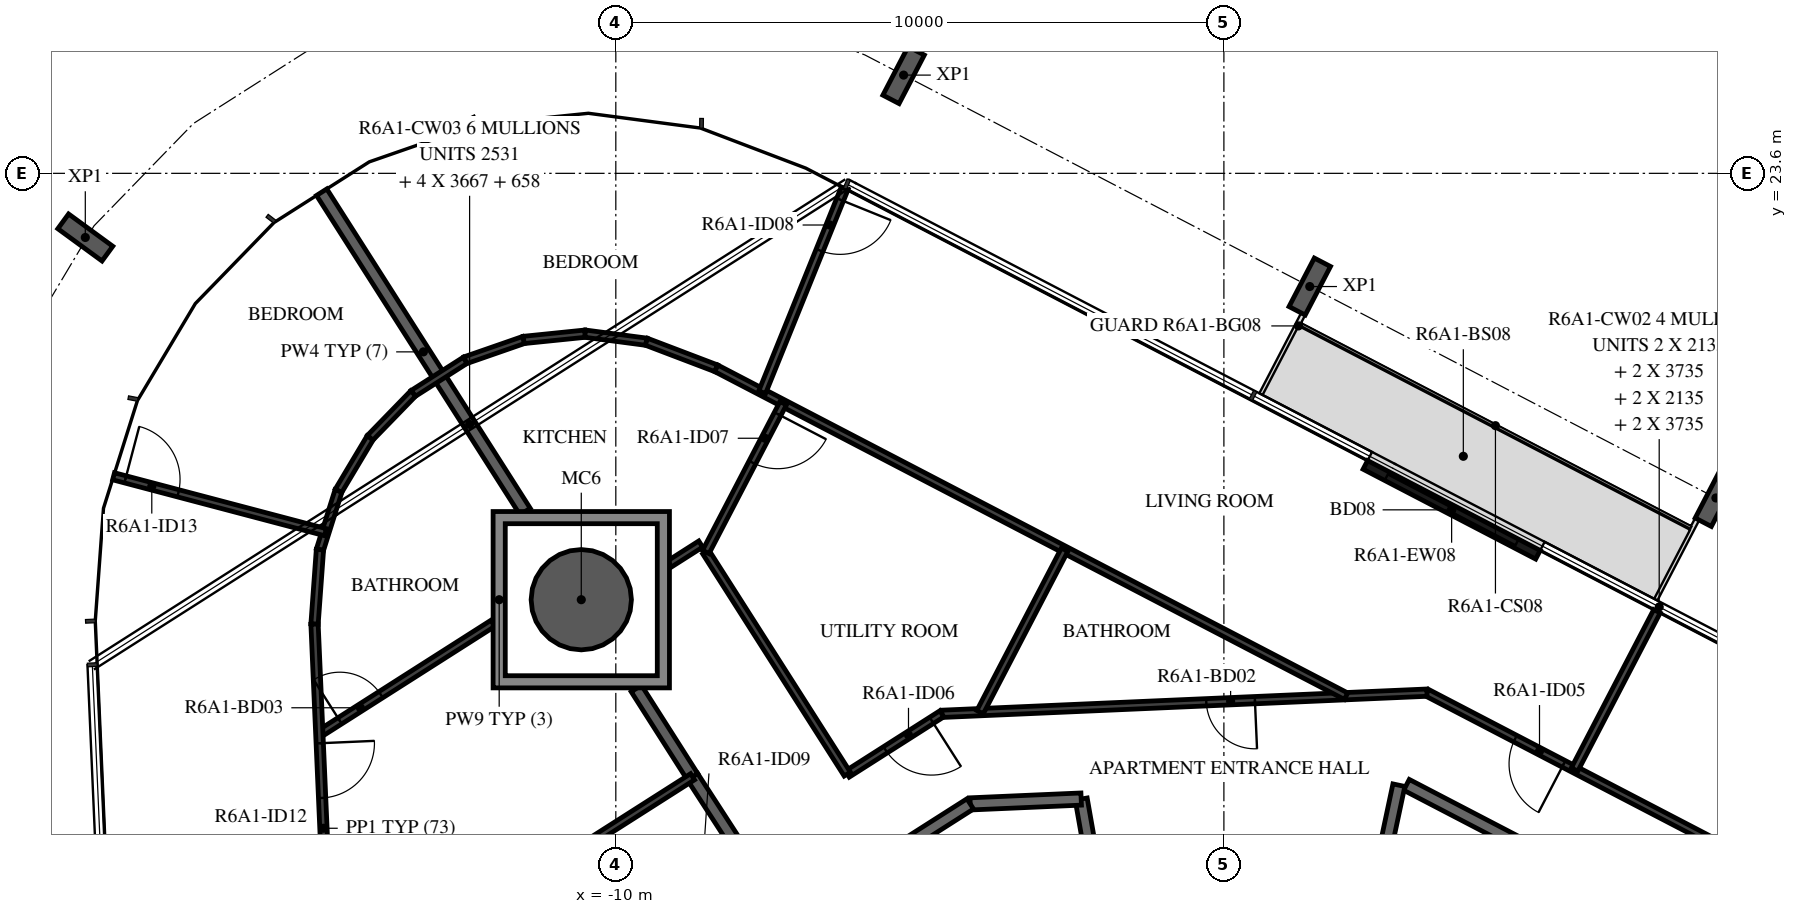
"""IFC4 building model, lengths in metres.
Left out: names, types, materials, properties, quantities, classifications, styles, units other than length and angle.
Written with IfcOpenShell. Run it as: python <this file> out.ifc"""

import sys

from ifc_helpers import new_model, si_unit, direction, frame, frame_2d, origin, origin_2d, place, context, subcontext, project, spatial, polyline, rectangle, hollow_circle, i_section, outline, extrude, element, fill, save


model = new_model("IFC4")
c1 = context("Model", 3, precision=1e-05, world=origin(), true_north=direction((0.0, 1.0)))
c2 = subcontext(c1, "Body", "Model", "MODEL_VIEW")
j1 = project(units=[si_unit("LENGTHUNIT", "METRE"), si_unit("PLANEANGLEUNIT", "RADIAN")], contexts=[c1])
p1 = place(None, origin())
s1 = spatial("IfcSite", under=j1, at=p1, CompositionType="ELEMENT")
p2 = place(p1, origin())
s2 = spatial("IfcBuilding", under=s1, at=p2, CompositionType="ELEMENT")
p3 = place(p2, frame((0.0, 0.0, 230.2)))
s3 = spatial("IfcBuildingStorey", under=s2, at=p3, CompositionType="ELEMENT", Elevation=230.2)
p4 = place(p3, frame((-10.568, 16.588, -0.38), z_axis=(0.0, 0.0, 1.0), x_axis=(1.0, 0.0, 0.0)))
e1 = element("IfcColumn", 1, at=p4, inside=s3, PredefinedType="COLUMN", context=c2, shape_type="SweptSolid", body=[
    extrude(hollow_circle(Radius=0.825, WallThickness=0.04, at=origin_2d()), origin(), (0.0, 0.0, 1.0), 3.5),
])
for number, where, z_axis, x_axis in (
    (2, (8.091, 18.261, -0.38), (0.0, 0.0, 1.0), (0.887, -0.462, 0.0)),
    (3, (1.412, 21.739, -0.38), (0.0, 0.0, 1.0), (0.887, -0.462, 0.0)),
    (4, (-5.267, 25.216, -0.38), (0.0, 0.0, 1.0), (0.887, -0.462, 0.0)),
    (5, (-18.724, 22.545, -0.38), (0.0, 0.0, 1.0), (0.59, 0.808, 0.0)),
):
    element("IfcColumn", number, at=place(p3, frame(where, z_axis=z_axis, x_axis=x_axis)), inside=s3, PredefinedType="COLUMN", context=c2, shape_type="SweptSolid", body=[
        extrude(i_section(OverallWidth=0.3, OverallDepth=0.9, WebThickness=0.019, FlangeThickness=0.035, FilletRadius=0.03, at=origin_2d()), origin(), (0.0, 0.0, 1.0), 3.5),
    ])
p5 = place(p3, frame((5.164, 17.327, 0.0), z_axis=(0.0, 0.0, 1.0), x_axis=(-0.886983100078, 0.461801884119, 0.0)))
e6 = element("IfcWall", 6, at=p5, inside=s3, PredefinedType="STANDARD", context=c2, shape_type="SweptSolid", body=[
    extrude(rectangle(XDim=3.2, YDim=0.16, at=frame_2d((1.6, 0.0))), origin(), (0.0, 0.0, 1.0), 3.12),
])
p6 = place(p5, frame((0.4, 0.0, 0.0)))
e7 = element("IfcOpeningElement", 7, at=p6, cuts=e6, PredefinedType="OPENING", context=c2, shape_type="SweptSolid", body=[
    extrude(rectangle(XDim=2.4, YDim=2.4, at=frame_2d((1.2, 1.2))), frame((0.0, 0.09, 0.0), z_axis=(0.0, -1.0, 0.0), x_axis=(1.0, 0.0, 0.0)), (0.0, 0.0, 1.0), 0.18),
])
p7 = place(p3, frame((9.372, 10.228, 0.0), z_axis=(0.0, 0.0, 1.0), x_axis=(-0.887005184532, 0.461759464021, 0.0)))
e8 = element("IfcWall", 8, at=p7, inside=s3, PredefinedType="STANDARD", context=c2, shape_type="SweptSolid", body=[
    extrude(rectangle(XDim=7.181, YDim=0.2, at=frame_2d((3.591, 0.0))), origin(), (0.0, 0.0, 1.0), 3.12),
])
p8 = place(p3, frame((2.878, 13.538, 0.0), z_axis=(0.0, 0.0, 1.0), x_axis=(-0.207893604596, -0.978151444904, 0.0)))
e9 = element("IfcWall", 9, at=p8, inside=s3, PredefinedType="STANDARD", context=c2, shape_type="SweptSolid", body=[
    extrude(rectangle(XDim=1.927, YDim=0.2, at=frame_2d((0.963, 0.0))), origin(), (0.0, 0.0, 1.0), 3.12),
])
p9 = place(p3, frame((-2.074, 11.761, 0.0), z_axis=(0.0, 0.0, 1.0), x_axis=(-0.173679082312, 0.984802303189, 0.0)))
e10 = element("IfcWall", 10, at=p9, inside=s3, PredefinedType="STANDARD", context=c2, shape_type="SweptSolid", body=[
    extrude(rectangle(XDim=1.573, YDim=0.2, at=frame_2d((0.787, 0.0))), origin(), (0.0, 0.0, 1.0), 3.12),
])
p10 = place(p3, frame((-2.347, 13.31, 0.0), z_axis=(0.0, 0.0, 1.0), x_axis=(-0.999050095671, -0.043576442492, 0.0)))
e11 = element("IfcWall", 11, at=p10, inside=s3, PredefinedType="STANDARD", context=c2, shape_type="SweptSolid", body=[
    extrude(rectangle(XDim=1.826, YDim=0.2, at=frame_2d((0.913, 0.0))), origin(), (0.0, 0.0, 1.0), 3.12),
])
p11 = place(p3, frame((-4.172, 13.231, 0.0), z_axis=(0.0, 0.0, 1.0), x_axis=(-0.843388394728, -0.537304397561, 0.0)))
e12 = element("IfcWall", 12, at=p11, inside=s3, PredefinedType="STANDARD", context=c2, shape_type="SweptSolid", body=[
    extrude(rectangle(XDim=7.181, YDim=0.2, at=frame_2d((3.59, 0.0))), origin(), (0.0, 0.0, 1.0), 3.12),
])
p12 = place(p3, frame((-8.738, 13.677, 0.0), z_axis=(0.0, 0.0, 1.0), x_axis=(0.54358037296, -0.839357121929, 0.0)))
e13 = element("IfcWall", 13, at=p12, inside=s3, PredefinedType="STANDARD", context=c2, shape_type="SweptSolid", body=[
    extrude(rectangle(XDim=2.83, YDim=0.2, at=frame_2d((1.415, 0.0))), origin(), (0.0, 0.0, 1.0), 3.12),
])
p13 = place(p3, frame((-9.663, 15.129, 0.0), z_axis=(0.0, 0.0, 1.0), x_axis=(0.537205715853, -0.843451254581, 0.0)))
e14 = element("IfcWall", 14, at=p13, inside=s3, PredefinedType="STANDARD", context=c2, shape_type="SweptSolid", body=[
    extrude(rectangle(XDim=1.722, YDim=0.2, at=frame_2d((0.861, 0.0))), origin(), (0.0, 0.0, 1.0), 3.12),
])
p14 = place(p3, frame((-14.837, 23.29, 0.0), z_axis=(0.0, 0.0, 1.0), x_axis=(0.537316863221, -0.843380452998, 0.0)))
e15 = element("IfcWall", 15, at=p14, inside=s3, PredefinedType="STANDARD", context=c2, shape_type="SweptSolid", body=[
    extrude(rectangle(XDim=6.227, YDim=0.2, at=frame_2d((3.113, 0.0))), origin(), (0.0, 0.0, 1.0), 3.12),
])
p15 = place(p3, frame((10.421, 11.373, 0.0), z_axis=(0.0, 0.0, 1.0), x_axis=(-0.887012970857, 0.461744506769, 0.0)))
e16 = element("IfcWall", 16, at=p15, inside=s3, PredefinedType="PARTITIONING", context=c2, shape_type="SweptSolid", body=[
    extrude(rectangle(XDim=7.985, YDim=0.12, at=frame_2d((3.992, 0.0))), origin(), (0.0, 0.0, 1.0), 3.12),
])
p16 = place(p15, frame((5.448, 0.0, 0.0)))
e17 = element("IfcOpeningElement", 17, at=p16, cuts=e16, PredefinedType="OPENING", context=c2, shape_type="SweptSolid", body=[
    extrude(rectangle(XDim=0.9, YDim=2.1, at=frame_2d((0.45, 1.05))), frame((0.0, 0.07, 0.0), z_axis=(0.0, -1.0, 0.0), x_axis=(1.0, 0.0, 0.0)), (0.0, 0.0, 1.0), 0.14),
])
p17 = place(p3, frame((3.339, 15.06, 0.0), z_axis=(0.0, 0.0, 1.0), x_axis=(-0.999047716945, -0.043630943905, 0.0)))
e18 = element("IfcWall", 18, at=p17, inside=s3, PredefinedType="PARTITIONING", context=c2, shape_type="SweptSolid", body=[
    extrude(rectangle(XDim=7.985, YDim=0.12, at=frame_2d((3.992, 0.0))), origin(), (0.0, 0.0, 1.0), 3.12),
])
p18 = place(p17, frame((2.831, 0.0, 0.0)))
e19 = element("IfcOpeningElement", 19, at=p18, cuts=e18, PredefinedType="OPENING", context=c2, shape_type="SweptSolid", body=[
    extrude(rectangle(XDim=0.8, YDim=2.1, at=frame_2d((0.4, 1.05))), frame((0.0, 0.07, 0.0), z_axis=(0.0, -1.0, 0.0), x_axis=(1.0, 0.0, 0.0)), (0.0, 0.0, 1.0), 0.14),
])
p19 = place(p3, frame((-4.639, 14.712, 0.0), z_axis=(0.0, 0.0, 1.0), x_axis=(-0.843361471414, -0.537346655833, 0.0)))
e20 = element("IfcWall", 20, at=p19, inside=s3, PredefinedType="PARTITIONING", context=c2, shape_type="SweptSolid", body=[
    extrude(rectangle(XDim=1.844, YDim=0.12, at=frame_2d((0.922, 0.0))), origin(), (0.0, 0.0, 1.0), 3.12),
])
p20 = place(p19, frame((0.2, 0.0, 0.0)))
e21 = element("IfcOpeningElement", 21, at=p20, cuts=e20, PredefinedType="OPENING", context=c2, shape_type="SweptSolid", body=[
    extrude(rectangle(XDim=0.9, YDim=2.1, at=frame_2d((0.45, 1.05))), frame((0.0, 0.07, 0.0), z_axis=(0.0, -1.0, 0.0), x_axis=(1.0, 0.0, 0.0)), (0.0, 0.0, 1.0), 0.14),
])
p21 = place(p3, frame((-6.194, 13.721, 0.0), z_axis=(0.0, 0.0, 1.0), x_axis=(-0.537316807294, 0.843380488629, 0.0)))
e22 = element("IfcWall", 22, at=p21, inside=s3, PredefinedType="PARTITIONING", context=c2, shape_type="SweptSolid", body=[
    extrude(rectangle(XDim=4.331, YDim=0.12, at=frame_2d((2.165, 0.0))), origin(), (0.0, 0.0, 1.0), 3.12),
])
p22 = place(p3, frame((-8.604, 17.504, 0.0), z_axis=(0.0, 0.0, 1.0), x_axis=(-0.843265746233, -0.537496866251, 0.0)))
e23 = element("IfcWall", 23, at=p22, inside=s3, PredefinedType="PARTITIONING", context=c2, shape_type="SweptSolid", body=[
    extrude(rectangle(XDim=0.61, YDim=0.12, at=frame_2d((0.305, 0.0))), origin(), (0.0, 0.0, 1.0), 3.12),
])
p23 = place(p3, frame((7.122, 16.399, 0.0), z_axis=(0.0, 0.0, 1.0), x_axis=(-0.461763975246, -0.887002836053, 0.0)))
e24 = element("IfcWall", 24, at=p23, inside=s3, PredefinedType="PARTITIONING", context=c2, shape_type="SweptSolid", body=[
    extrude(rectangle(XDim=2.934, YDim=0.12, at=frame_2d((1.467, 0.0))), origin(), (0.0, 0.0, 1.0), 2.73),
])
p24 = place(p3, frame((-8.35, 20.394, 0.0), z_axis=(0.0, 0.0, 1.0), x_axis=(0.887020940825, -0.461729196107, 0.0)))
e25 = element("IfcWall", 25, at=p24, inside=s3, PredefinedType="PARTITIONING", context=c2, shape_type="SweptSolid", body=[
    extrude(rectangle(XDim=11.678, YDim=0.12, at=frame_2d((5.839, 0.0))), origin(), (0.0, 0.0, 1.0), 3.12),
])
p25 = place(p3, frame((-6.237, 23.353, 0.0), z_axis=(0.0, 0.0, 1.0), x_axis=(-0.375089171101, -0.92698873441, 0.0)))
e26 = element("IfcWall", 26, at=p25, inside=s3, PredefinedType="PARTITIONING", context=c2, shape_type="SweptSolid", body=[
    extrude(rectangle(XDim=3.616, YDim=0.12, at=frame_2d((1.808, 0.0))), origin(), (0.0, 0.0, 1.0), 2.73),
])
p26 = place(p25, frame((0.2, 0.0, 0.0)))
e27 = element("IfcOpeningElement", 27, at=p26, cuts=e26, PredefinedType="OPENING", context=c2, shape_type="SweptSolid", body=[
    extrude(rectangle(XDim=0.9, YDim=2.1, at=frame_2d((0.45, 1.05))), frame((0.0, 0.07, 0.0), z_axis=(0.0, -1.0, 0.0), x_axis=(1.0, 0.0, 0.0)), (0.0, 0.0, 1.0), 0.14),
])
p27 = place(p3, frame((-2.619, 17.411, 0.0), z_axis=(0.0, 0.0, 1.0), x_axis=(-0.461743141736, -0.887013681439, 0.0)))
e28 = element("IfcWall", 28, at=p27, inside=s3, PredefinedType="PARTITIONING", context=c2, shape_type="SweptSolid", body=[
    extrude(rectangle(XDim=3.012, YDim=0.12, at=frame_2d((1.506, 0.0))), origin(), (0.0, 0.0, 1.0), 3.12),
])
p28 = place(p3, frame((-7.247, 19.82, 0.0), z_axis=(0.0, 0.0, 1.0), x_axis=(-0.46174004932, -0.887015291218, 0.0)))
e29 = element("IfcWall", 29, at=p28, inside=s3, PredefinedType="PARTITIONING", context=c2, shape_type="SweptSolid", body=[
    extrude(rectangle(XDim=2.759, YDim=0.12, at=frame_2d((1.379, 0.0))), origin(), (0.0, 0.0, 1.0), 3.12),
])
p29 = place(p28, frame((0.2, 0.0, 0.0)))
e30 = element("IfcOpeningElement", 30, at=p29, cuts=e29, PredefinedType="OPENING", context=c2, shape_type="SweptSolid", body=[
    extrude(rectangle(XDim=0.9, YDim=2.1, at=frame_2d((0.45, 1.05))), frame((0.0, 0.07, 0.0), z_axis=(0.0, -1.0, 0.0), x_axis=(1.0, 0.0, 0.0)), (0.0, 0.0, 1.0), 0.14),
])
for number, where, z_axis, x_axis in (
    (31, (-13.332, 19.981, 0.0), (0.0, 0.0, 1.0), (0.843, 0.537, 0.0)),
    (32, (-12.475, 20.527, 0.0), (0.0, 0.0, 1.0), (0.945, 0.328, 0.0)),
):
    element("IfcWall", number, at=place(p3, frame(where, z_axis=z_axis, x_axis=x_axis)), inside=s3, PredefinedType="PARTITIONING", context=c2, shape_type="SweptSolid", body=[
        extrude(rectangle(XDim=1.016, YDim=0.12, at=frame_2d((0.508, 0.0))), origin(), (0.0, 0.0, 1.0), 3.12),
    ])
p30 = place(p3, frame((-11.515, 20.86, 0.0), z_axis=(0.0, 0.0, 1.0), x_axis=(0.994818278641, 0.101669034034, 0.0)))
e33 = element("IfcWall", 33, at=p30, inside=s3, PredefinedType="PARTITIONING", context=c2, shape_type="SweptSolid", body=[
    extrude(rectangle(XDim=1.016, YDim=0.12, at=frame_2d((0.508, 0.0))), origin(), (0.0, 0.0, 1.0), 3.12),
])
p31 = place(p3, frame((-10.504, 20.963, 0.0), z_axis=(0.0, 0.0, 1.0), x_axis=(0.991451023706, -0.13047937612, 0.0)))
e34 = element("IfcWall", 34, at=p31, inside=s3, PredefinedType="PARTITIONING", context=c2, shape_type="SweptSolid", body=[
    extrude(rectangle(XDim=1.016, YDim=0.12, at=frame_2d((0.508, 0.0))), origin(), (0.0, 0.0, 1.0), 3.12),
])
p32 = place(p3, frame((-9.497, 20.831, 0.0), z_axis=(0.0, 0.0, 1.0), x_axis=(0.934575963521, -0.355763641213, 0.0)))
e35 = element("IfcWall", 35, at=p32, inside=s3, PredefinedType="PARTITIONING", context=c2, shape_type="SweptSolid", body=[
    extrude(rectangle(XDim=1.227, YDim=0.12, at=frame_2d((0.614, 0.0))), origin(), (0.0, 0.0, 1.0), 3.12),
])
for number, where, z_axis, x_axis in (
    (36, (-14.865, 17.411, 0.0), (0.0, 0.0, 1.0), (0.301, 0.954, 0.0)),
    (37, (-14.56, 18.38, 0.0), (0.0, 0.0, 1.0), (0.513, 0.859, 0.0)),
    (38, (-14.039, 19.252, 0.0), (0.0, 0.0, 1.0), (0.697, 0.717, 0.0)),
):
    element("IfcWall", number, at=place(p3, frame(where, z_axis=z_axis, x_axis=x_axis)), inside=s3, PredefinedType="PARTITIONING", context=c2, shape_type="SweptSolid", body=[
        extrude(rectangle(XDim=1.016, YDim=0.12, at=frame_2d((0.508, 0.0))), origin(), (0.0, 0.0, 1.0), 3.12),
    ])
p33 = place(p3, frame((-18.26, 18.618, 0.0), z_axis=(0.0, 0.0, 1.0), x_axis=(0.96689176932, -0.25518680691, 0.0)))
e39 = element("IfcWall", 39, at=p33, inside=s3, PredefinedType="PARTITIONING", context=c2, shape_type="SweptSolid", body=[
    extrude(rectangle(XDim=3.604, YDim=0.12, at=frame_2d((1.802, 0.0))), origin(), (0.0, 0.0, 1.0), 3.12),
])
p34 = place(p33, frame((0.2, 0.0, 0.0)))
e40 = element("IfcOpeningElement", 40, at=p34, cuts=e39, PredefinedType="OPENING", context=c2, shape_type="SweptSolid", body=[
    extrude(rectangle(XDim=0.9, YDim=2.1, at=frame_2d((0.45, 1.05))), frame((0.0, 0.07, 0.0), z_axis=(0.0, -1.0, 0.0), x_axis=(1.0, 0.0, 0.0)), (0.0, 0.0, 1.0), 0.14),
])
p35 = place(p3, frame((-14.876, 14.382, 0.0), z_axis=(0.0, 0.0, 1.0), x_axis=(0.843409222082, 0.537271704175, 0.0)))
e41 = element("IfcWall", 41, at=p35, inside=s3, PredefinedType="PARTITIONING", context=c2, shape_type="SweptSolid", body=[
    extrude(rectangle(XDim=3.388, YDim=0.12, at=frame_2d((1.694, 0.0))), origin(), (0.0, 0.0, 1.0), 3.12),
])
p36 = place(p35, frame((0.4, 0.0, 0.0)))
e42 = element("IfcOpeningElement", 42, at=p36, cuts=e41, PredefinedType="OPENING", context=c2, shape_type="SweptSolid", body=[
    extrude(rectangle(XDim=0.8, YDim=2.1, at=frame_2d((0.4, 1.05))), frame((0.0, 0.07, 0.0), z_axis=(0.0, -1.0, 0.0), x_axis=(1.0, 0.0, 0.0)), (0.0, 0.0, 1.0), 0.14),
])
p37 = place(p3, frame((-14.865, 17.411, 0.0), z_axis=(0.0, 0.0, 1.0), x_axis=(-0.072618457011, -0.997359794508, 0.0)))
e43 = element("IfcWall", 43, at=p37, inside=s3, PredefinedType="PARTITIONING", context=c2, shape_type="SweptSolid", body=[
    extrude(rectangle(XDim=1.227, YDim=0.12, at=frame_2d((0.614, 0.0))), origin(), (0.0, 0.0, 1.0), 3.12),
])
p38 = place(p3, frame((-14.955, 16.187, 0.0), z_axis=(0.0, 0.0, 1.0), x_axis=(0.043591713888, -0.999049429448, 0.0)))
e44 = element("IfcWall", 44, at=p38, inside=s3, PredefinedType="PARTITIONING", context=c2, shape_type="SweptSolid", body=[
    extrude(rectangle(XDim=6.721, YDim=0.12, at=frame_2d((3.36, 0.0))), origin(), (0.0, 0.0, 1.0), 3.12),
])
p39 = place(p38, frame((1.961, 0.0, 0.0)))
e45 = element("IfcOpeningElement", 45, at=p39, cuts=e44, PredefinedType="OPENING", context=c2, shape_type="SweptSolid", body=[
    extrude(rectangle(XDim=0.9, YDim=2.1, at=frame_2d((0.45, 1.05))), frame((0.0, 0.07, 0.0), z_axis=(0.0, -1.0, 0.0), x_axis=(1.0, 0.0, 0.0)), (0.0, 0.0, 1.0), 0.14),
])
p40 = place(p3, frame((-14.68, 9.891, 0.0), z_axis=(0.0, 0.0, 1.0), x_axis=(0.843391697183, 0.537299213774, 0.0)))
e46 = element("IfcWall", 46, at=p40, inside=s3, PredefinedType="PARTITIONING", context=c2, shape_type="SweptSolid", body=[
    extrude(rectangle(XDim=7.045, YDim=0.12, at=frame_2d((3.522, 0.0))), origin(), (0.0, 0.0, 1.0), 3.12),
])
p41 = place(p40, frame((0.4, 0.0, 0.0)))
e47 = element("IfcOpeningElement", 47, at=p41, cuts=e46, PredefinedType="OPENING", context=c2, shape_type="SweptSolid", body=[
    extrude(rectangle(XDim=0.9, YDim=2.1, at=frame_2d((0.45, 1.05))), frame((0.0, 0.07, 0.0), z_axis=(0.0, -1.0, 0.0), x_axis=(1.0, 0.0, 0.0)), (0.0, 0.0, 1.0), 0.14),
])
p42 = place(p3, origin())
e48 = element("IfcWall", 48, at=p42, inside=s3, PredefinedType="STANDARD", context=c2, shape_type="SweptSolid", body=[
    extrude(outline(polyline([(-9.118, 18.038), (-9.118, 15.138), (-12.018, 15.138), (-12.018, 18.038), (-9.118, 18.038)]), holes=[polyline([(-11.818, 15.338), (-9.318, 15.338), (-9.318, 17.838), (-11.818, 17.838), (-11.818, 15.338)])]), origin(), (0.0, 0.0, 1.0), 3.12),
])
p43 = place(p6, origin())
e49 = element("IfcDoor", 49, at=p43, inside=s3, OperationType="DOUBLE_DOOR_SLIDING", PredefinedType="DOOR", context=c2, shape_type="SweptSolid", body=[
    extrude(rectangle(XDim=2.4, YDim=2.4, at=frame_2d((1.2, 1.2))), frame((0.0, 0.025, 0.0), z_axis=(0.0, -1.0, 0.0), x_axis=(1.0, 0.0, 0.0)), (0.0, 0.0, 1.0), 0.05),
])
fill(e7, e49)
p44 = place(p16, origin())
e50 = element("IfcDoor", 50, at=p44, inside=s3, OperationType="SINGLE_SWING_RIGHT", PredefinedType="DOOR", context=c2, shape_type="SweptSolid", body=[
    extrude(rectangle(XDim=0.9, YDim=2.1, at=frame_2d((0.45, 1.05))), frame((0.0, 0.025, 0.0), z_axis=(0.0, -1.0, 0.0), x_axis=(1.0, 0.0, 0.0)), (0.0, 0.0, 1.0), 0.05),
])
fill(e17, e50)
p45 = place(p18, origin())
e51 = element("IfcDoor", 51, at=p45, inside=s3, OperationType="SINGLE_SWING_RIGHT", PredefinedType="DOOR", context=c2, shape_type="SweptSolid", body=[
    extrude(rectangle(XDim=0.8, YDim=2.1, at=frame_2d((0.4, 1.05))), frame((0.0, 0.025, 0.0), z_axis=(0.0, -1.0, 0.0), x_axis=(1.0, 0.0, 0.0)), (0.0, 0.0, 1.0), 0.05),
])
fill(e19, e51)
p46 = place(p20, origin())
e52 = element("IfcDoor", 52, at=p46, inside=s3, OperationType="SINGLE_SWING_RIGHT", PredefinedType="DOOR", context=c2, shape_type="SweptSolid", body=[
    extrude(rectangle(XDim=0.9, YDim=2.1, at=frame_2d((0.45, 1.05))), frame((0.0, 0.025, 0.0), z_axis=(0.0, -1.0, 0.0), x_axis=(1.0, 0.0, 0.0)), (0.0, 0.0, 1.0), 0.05),
])
fill(e21, e52)
p47 = place(p29, origin())
e53 = element("IfcDoor", 53, at=p47, inside=s3, OperationType="SINGLE_SWING_RIGHT", PredefinedType="DOOR", context=c2, shape_type="SweptSolid", body=[
    extrude(rectangle(XDim=0.9, YDim=2.1, at=frame_2d((0.45, 1.05))), frame((0.0, 0.025, 0.0), z_axis=(0.0, -1.0, 0.0), x_axis=(1.0, 0.0, 0.0)), (0.0, 0.0, 1.0), 0.05),
])
fill(e30, e53)
p48 = place(p26, origin())
e54 = element("IfcDoor", 54, at=p48, inside=s3, OperationType="SINGLE_SWING_RIGHT", PredefinedType="DOOR", context=c2, shape_type="SweptSolid", body=[
    extrude(rectangle(XDim=0.9, YDim=2.1, at=frame_2d((0.45, 1.05))), frame((0.0, 0.025, 0.0), z_axis=(0.0, -1.0, 0.0), x_axis=(1.0, 0.0, 0.0)), (0.0, 0.0, 1.0), 0.05),
])
fill(e27, e54)
p49 = place(p36, origin())
e55 = element("IfcDoor", 55, at=p49, inside=s3, OperationType="SINGLE_SWING_LEFT", PredefinedType="DOOR", context=c2, shape_type="SweptSolid", body=[
    extrude(rectangle(XDim=0.8, YDim=2.1, at=frame_2d((0.4, 1.05))), frame((0.0, 0.025, 0.0), z_axis=(0.0, -1.0, 0.0), x_axis=(1.0, 0.0, 0.0)), (0.0, 0.0, 1.0), 0.05),
])
fill(e42, e55)
p50 = place(p39, origin())
e56 = element("IfcDoor", 56, at=p50, inside=s3, OperationType="SINGLE_SWING_LEFT", PredefinedType="DOOR", context=c2, shape_type="SweptSolid", body=[
    extrude(rectangle(XDim=0.9, YDim=2.1, at=frame_2d((0.45, 1.05))), frame((0.0, 0.025, 0.0), z_axis=(0.0, -1.0, 0.0), x_axis=(1.0, 0.0, 0.0)), (0.0, 0.0, 1.0), 0.05),
])
fill(e45, e56)
p51 = place(p34, origin())
e57 = element("IfcDoor", 57, at=p51, inside=s3, OperationType="SINGLE_SWING_LEFT", PredefinedType="DOOR", context=c2, shape_type="SweptSolid", body=[
    extrude(rectangle(XDim=0.9, YDim=2.1, at=frame_2d((0.45, 1.05))), frame((0.0, 0.025, 0.0), z_axis=(0.0, -1.0, 0.0), x_axis=(1.0, 0.0, 0.0)), (0.0, 0.0, 1.0), 0.05),
])
fill(e40, e57)
save(model, sys.argv[1])
